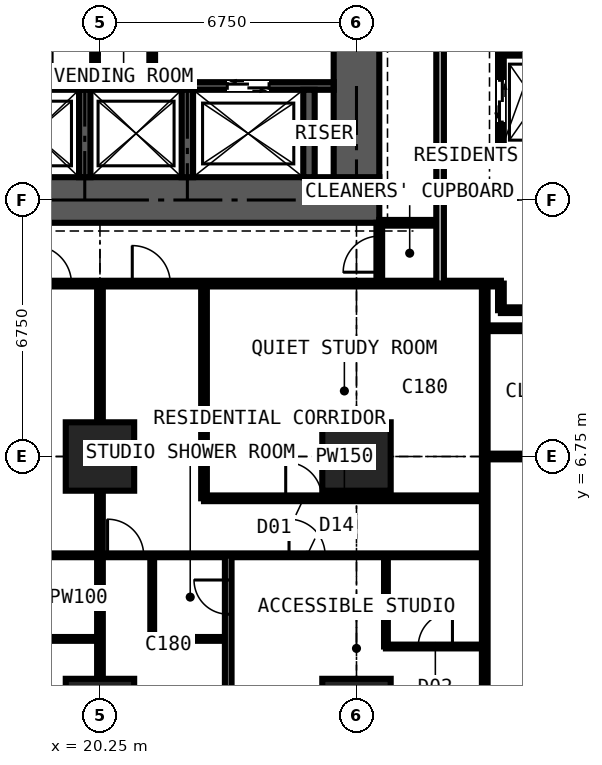
"""IFC4 building model, lengths in metres.
Left out: names, types, materials, properties, quantities, classifications, styles, units other than length and angle.
Written with IfcOpenShell. Run it as: python <this file> out.ifc"""

import sys

from ifc_helpers import new_model, si_unit, direction, frame, frame_2d, origin, origin_2d, place, context, subcontext, project, spatial, rectangle, extrude, element, fill, save


model = new_model("IFC4")
c1 = context("Model", 3, precision=1e-05, world=origin(), true_north=direction((0.0, 1.0)))
c2 = subcontext(c1, "Body", "Model", "MODEL_VIEW")
j1 = project(units=[si_unit("LENGTHUNIT", "METRE"), si_unit("PLANEANGLEUNIT", "RADIAN")], contexts=[c1])
p1 = place(None, origin())
s1 = spatial("IfcSite", under=j1, at=p1, CompositionType="ELEMENT")
p2 = place(p1, origin())
s2 = spatial("IfcBuilding", under=s1, at=p2, CompositionType="ELEMENT")
p3 = place(p2, frame((0.0, 0.0, 57.6)))
s3 = spatial("IfcBuildingStorey", under=s2, at=p3, CompositionType="ELEMENT", Elevation=57.6)
for number, where, z_axis, x_axis in (
    (1, (20.25, 0.0, 0.0), (0.0, 0.0, 1.0), (1.0, 0.0, 0.0)),
    (2, (20.25, 6.75, 0.0), (0.0, 0.0, 1.0), (1.0, 0.0, 0.0)),
    (3, (27.0, 0.0, 0.0), (0.0, 0.0, 1.0), (1.0, 0.0, 0.0)),
    (4, (27.0, 6.75, 0.0), (0.0, 0.0, 1.0), (1.0, 0.0, 0.0)),
):
    element("IfcColumn", number, at=place(p3, frame(where, z_axis=z_axis, x_axis=x_axis)), inside=s3, PredefinedType="COLUMN", context=c2, shape_type="SweptSolid", body=[
        extrude(rectangle(XDim=1.8, YDim=1.8, at=origin_2d()), origin(), (0.0, 0.0, 1.0), 3.6),
    ])
p4 = place(p3, frame((12.9, 13.5, 0.0), z_axis=(0.0, 0.0, 1.0), x_axis=(1.0, 0.0, 0.0)))
e5 = element("IfcWall", 5, at=p4, inside=s3, PredefinedType="SHEAR", context=c2, shape_type="SweptSolid", body=[
    extrude(rectangle(XDim=14.7, YDim=1.2, at=frame_2d((7.35, 0.0))), origin(), (0.0, 0.0, 1.0), 3.6),
])
p5 = place(p3, frame((27.0, 14.1, 0.0), z_axis=(0.0, 0.0, 1.0), x_axis=(0.0, 1.0, 0.0)))
e6 = element("IfcWall", 6, at=p5, inside=s3, PredefinedType="SHEAR", context=c2, shape_type="SweptSolid", body=[
    extrude(rectangle(XDim=12.3, YDim=1.2, at=frame_2d((6.15, 0.0))), origin(), (0.0, 0.0, 1.0), 3.6),
])
p6 = place(p5, frame((3.65, 0.0, 0.0)))
e7 = element("IfcOpeningElement", 7, at=p6, cuts=e6, PredefinedType="OPENING", context=c2, shape_type="SweptSolid", body=[
    extrude(rectangle(XDim=1.2, YDim=2.2, at=frame_2d((0.6, 1.1))), frame((0.0, 0.61, 0.0), z_axis=(0.0, -1.0, 0.0), x_axis=(1.0, 0.0, 0.0)), (0.0, 0.0, 1.0), 1.22),
])
p7 = place(p3, frame((14.1, 16.5, 0.0), z_axis=(0.0, 0.0, 1.0), x_axis=(1.0, 0.0, 0.0)))
e8 = element("IfcWall", 8, at=p7, inside=s3, PredefinedType="SHEAR", context=c2, shape_type="SweptSolid", body=[
    extrude(rectangle(XDim=12.3, YDim=0.2, at=frame_2d((6.15, 0.0))), origin(), (0.0, 0.0, 1.0), 3.6),
])
p8 = place(p7, frame((0.9, 0.0, 0.0)))
e9 = element("IfcOpeningElement", 9, at=p8, cuts=e8, PredefinedType="OPENING", context=c2, shape_type="SweptSolid", body=[
    extrude(rectangle(XDim=1.1, YDim=2.2, at=frame_2d((0.55, 1.1))), frame((0.0, 0.11, 0.0), z_axis=(0.0, -1.0, 0.0), x_axis=(1.0, 0.0, 0.0)), (0.0, 0.0, 1.0), 0.22),
])
p9 = place(p7, frame((9.5, 0.0, 0.0)))
e10 = element("IfcOpeningElement", 10, at=p9, cuts=e8, PredefinedType="OPENING", context=c2, shape_type="SweptSolid", body=[
    extrude(rectangle(XDim=1.1, YDim=2.2, at=frame_2d((0.55, 1.1))), frame((0.0, 0.11, 0.0), z_axis=(0.0, -1.0, 0.0), x_axis=(1.0, 0.0, 0.0)), (0.0, 0.0, 1.0), 0.22),
])
for number, where, z_axis, x_axis in (
    (11, (19.85, 14.1, 0.0), (0.0, 0.0, 1.0), (0.0, 1.0, 0.0)),
    (12, (22.55, 14.1, 0.0), (0.0, 0.0, 1.0), (0.0, 1.0, 0.0)),
    (13, (25.75, 14.1, 0.0), (0.0, 0.0, 1.0), (0.0, 1.0, 0.0)),
):
    element("IfcWall", number, at=place(p3, frame(where, z_axis=z_axis, x_axis=x_axis)), inside=s3, PredefinedType="SHEAR", context=c2, shape_type="SweptSolid", body=[
        extrude(rectangle(XDim=2.3, YDim=0.3, at=frame_2d((1.15, 0.0))), origin(), (0.0, 0.0, 1.0), 3.6),
    ])
p10 = place(p3, frame((21.625, 16.6, 0.0), z_axis=(0.0, 0.0, 1.0), x_axis=(0.0, 1.0, 0.0)))
e14 = element("IfcWall", 14, at=p10, inside=s3, PredefinedType="PARTITIONING", context=c2, shape_type="SweptSolid", body=[
    extrude(rectangle(XDim=3.5, YDim=0.15, at=frame_2d((1.75, 0.0))), origin(), (0.0, 0.0, 1.0), 3.375),
])
p11 = place(p10, frame((1.15, 0.0, 0.0)))
e15 = element("IfcOpeningElement", 15, at=p11, cuts=e14, PredefinedType="OPENING", context=c2, shape_type="SweptSolid", body=[
    extrude(rectangle(XDim=1.2, YDim=2.2, at=frame_2d((0.6, 1.1))), frame((0.0, 0.085, 0.0), z_axis=(0.0, -1.0, 0.0), x_axis=(1.0, 0.0, 0.0)), (0.0, 0.0, 1.0), 0.17),
])
p12 = place(p3, frame((20.12, 16.6, 0.0), z_axis=(0.0, 0.0, 1.0), x_axis=(0.0, 1.0, 0.0)))
e16 = element("IfcWall", 16, at=p12, inside=s3, PredefinedType="PARTITIONING", context=c2, shape_type="SweptSolid", body=[
    extrude(rectangle(XDim=3.5, YDim=0.15, at=frame_2d((1.75, 0.0))), origin(), (0.0, 0.0, 1.0), 3.375),
])
p13 = place(p3, frame((6.75, 4.15, 0.0), z_axis=(0.0, 0.0, 1.0), x_axis=(1.0, 0.0, 0.0)))
e17 = element("IfcWall", 17, at=p13, inside=s3, PredefinedType="PARTITIONING", context=c2, shape_type="SweptSolid", body=[
    extrude(rectangle(XDim=23.625, YDim=0.1, at=frame_2d((11.812, 0.0))), origin(), (0.0, 0.0, 1.0), 3.375),
])
p14 = place(p13, frame((2.85, 0.0, 0.0)))
e18 = element("IfcOpeningElement", 18, at=p14, cuts=e17, PredefinedType="OPENING", context=c2, shape_type="SweptSolid", body=[
    extrude(rectangle(XDim=1.0, YDim=2.2, at=frame_2d((0.5, 1.1))), frame((0.0, 0.06, 0.0), z_axis=(0.0, -1.0, 0.0), x_axis=(1.0, 0.0, 0.0)), (0.0, 0.0, 1.0), 0.12),
])
p15 = place(p13, frame((6.95, 0.0, 0.0)))
e19 = element("IfcOpeningElement", 19, at=p15, cuts=e17, PredefinedType="OPENING", context=c2, shape_type="SweptSolid", body=[
    extrude(rectangle(XDim=0.95, YDim=2.2, at=frame_2d((0.475, 1.1))), frame((0.0, 0.06, 0.0), z_axis=(0.0, -1.0, 0.0), x_axis=(1.0, 0.0, 0.0)), (0.0, 0.0, 1.0), 0.12),
])
p16 = place(p13, frame((10.375, 0.0, 0.0)))
e20 = element("IfcOpeningElement", 20, at=p16, cuts=e17, PredefinedType="OPENING", context=c2, shape_type="SweptSolid", body=[
    extrude(rectangle(XDim=0.95, YDim=2.2, at=frame_2d((0.475, 1.1))), frame((0.0, 0.06, 0.0), z_axis=(0.0, -1.0, 0.0), x_axis=(1.0, 0.0, 0.0)), (0.0, 0.0, 1.0), 0.12),
])
p17 = place(p13, frame((18.475, 0.0, 0.0)))
e21 = element("IfcOpeningElement", 21, at=p17, cuts=e17, PredefinedType="OPENING", context=c2, shape_type="SweptSolid", body=[
    extrude(rectangle(XDim=0.95, YDim=2.2, at=frame_2d((0.475, 1.1))), frame((0.0, 0.06, 0.0), z_axis=(0.0, -1.0, 0.0), x_axis=(1.0, 0.0, 0.0)), (0.0, 0.0, 1.0), 0.12),
])
p18 = place(p13, frame((13.7, 0.0, 0.0)))
e22 = element("IfcOpeningElement", 22, at=p18, cuts=e17, PredefinedType="OPENING", context=c2, shape_type="SweptSolid", body=[
    extrude(rectangle(XDim=0.95, YDim=2.2, at=frame_2d((0.475, 1.1))), frame((0.0, 0.06, 0.0), z_axis=(0.0, -1.0, 0.0), x_axis=(1.0, 0.0, 0.0)), (0.0, 0.0, 1.0), 0.12),
])
p19 = place(p3, frame((10.125, 11.3, 0.0), z_axis=(0.0, 0.0, 1.0), x_axis=(1.0, 0.0, 0.0)))
e23 = element("IfcWall", 23, at=p19, inside=s3, PredefinedType="PARTITIONING", context=c2, shape_type="SweptSolid", body=[
    extrude(rectangle(XDim=20.675, YDim=0.15, at=frame_2d((10.337, 0.0))), origin(), (0.0, 0.0, 1.0), 3.375),
])
p20 = place(p19, frame((8.375, 0.0, 0.0)))
e24 = element("IfcOpeningElement", 24, at=p20, cuts=e23, PredefinedType="OPENING", context=c2, shape_type="SweptSolid", body=[
    extrude(rectangle(XDim=1.0, YDim=2.2, at=frame_2d((0.5, 1.1))), frame((0.0, 0.085, 0.0), z_axis=(0.0, -1.0, 0.0), x_axis=(1.0, 0.0, 0.0)), (0.0, 0.0, 1.0), 0.17),
])
p21 = place(p19, frame((10.975, 0.0, 0.0)))
e25 = element("IfcOpeningElement", 25, at=p21, cuts=e23, PredefinedType="OPENING", context=c2, shape_type="SweptSolid", body=[
    extrude(rectangle(XDim=1.0, YDim=2.2, at=frame_2d((0.5, 1.1))), frame((0.0, 0.085, 0.0), z_axis=(0.0, -1.0, 0.0), x_axis=(1.0, 0.0, 0.0)), (0.0, 0.0, 1.0), 0.17),
])
p22 = place(p19, frame((3.925, 0.0, 0.0)))
e26 = element("IfcOpeningElement", 26, at=p22, cuts=e23, PredefinedType="OPENING", context=c2, shape_type="SweptSolid", body=[
    extrude(rectangle(XDim=0.95, YDim=2.2, at=frame_2d((0.475, 1.1))), frame((0.0, 0.085, 0.0), z_axis=(0.0, -1.0, 0.0), x_axis=(1.0, 0.0, 0.0)), (0.0, 0.0, 1.0), 0.17),
])
p23 = place(p3, frame((18.25, 1.95, 0.0), z_axis=(0.0, 0.0, 1.0), x_axis=(1.0, 0.0, 0.0)))
e27 = element("IfcWall", 27, at=p23, inside=s3, PredefinedType="PARTITIONING", context=c2, shape_type="SweptSolid", body=[
    extrude(rectangle(XDim=2.0, YDim=0.1, at=frame_2d((1.0, 0.0))), origin(), (0.0, 0.0, 1.0), 3.375),
])
p24 = place(p3, frame((20.25, -0.734, 0.0), z_axis=(0.0, 0.0, 1.0), x_axis=(0.0, 1.0, 0.0)))
e28 = element("IfcWall", 28, at=p24, inside=s3, PredefinedType="PARTITIONING", context=c2, shape_type="SweptSolid", body=[
    extrude(rectangle(XDim=12.034, YDim=0.15, at=frame_2d((6.017, 0.0))), origin(), (0.0, 0.0, 1.0), 2.61),
])
p25 = place(p3, frame((21.625, 1.95, 0.0), z_axis=(0.0, 0.0, 1.0), x_axis=(0.0, 1.0, 0.0)))
e29 = element("IfcWall", 29, at=p25, inside=s3, PredefinedType="PARTITIONING", context=c2, shape_type="SweptSolid", body=[
    extrude(rectangle(XDim=2.2, YDim=0.1, at=frame_2d((1.1, 0.0))), origin(), (0.0, 0.0, 1.0), 3.375),
])
p26 = place(p3, frame((21.625, 1.95, 0.0), z_axis=(0.0, 0.0, 1.0), x_axis=(1.0, 0.0, 0.0)))
e30 = element("IfcWall", 30, at=p26, inside=s3, PredefinedType="PARTITIONING", context=c2, shape_type="SweptSolid", body=[
    extrude(rectangle(XDim=2.0, YDim=0.1, at=frame_2d((1.0, 0.0))), origin(), (0.0, 0.0, 1.0), 3.375),
])
p27 = place(p3, frame((22.988, 5.65, 0.0), z_axis=(0.0, 0.0, 1.0), x_axis=(1.0, 0.0, 0.0)))
e31 = element("IfcWall", 31, at=p27, inside=s3, PredefinedType="PARTITIONING", context=c2, shape_type="SweptSolid", body=[
    extrude(rectangle(XDim=7.387, YDim=0.15, at=frame_2d((3.694, 0.0))), origin(), (0.0, 0.0, 1.0), 3.375),
])
p28 = place(p27, frame((2.15, 0.0, 0.0)))
e32 = element("IfcOpeningElement", 32, at=p28, cuts=e31, PredefinedType="OPENING", context=c2, shape_type="SweptSolid", body=[
    extrude(rectangle(XDim=0.95, YDim=2.2, at=frame_2d((0.475, 1.1))), frame((0.0, 0.085, 0.0), z_axis=(0.0, -1.0, 0.0), x_axis=(1.0, 0.0, 0.0)), (0.0, 0.0, 1.0), 0.17),
])
p29 = place(p3, frame((22.988, 5.65, 0.0), z_axis=(0.0, 0.0, 1.0), x_axis=(0.0, 1.0, 0.0)))
e33 = element("IfcWall", 33, at=p29, inside=s3, PredefinedType="PARTITIONING", context=c2, shape_type="SweptSolid", body=[
    extrude(rectangle(XDim=5.65, YDim=0.15, at=frame_2d((2.825, 0.0))), origin(), (0.0, 0.0, 1.0), 3.375),
])
p30 = place(p3, frame((23.625, -0.734, 0.0), z_axis=(0.0, 0.0, 1.0), x_axis=(0.0, 1.0, 0.0)))
e34 = element("IfcWall", 34, at=p30, inside=s3, PredefinedType="PARTITIONING", context=c2, shape_type="SweptSolid", body=[
    extrude(rectangle(XDim=4.884, YDim=0.175, at=frame_2d((2.442, 0.0))), origin(), (0.0, 0.0, 1.0), 3.375),
])
p31 = place(p30, frame((3.334, 0.0, 0.0)))
e35 = element("IfcOpeningElement", 35, at=p31, cuts=e34, PredefinedType="OPENING", context=c2, shape_type="SweptSolid", body=[
    extrude(rectangle(XDim=0.9, YDim=2.2, at=frame_2d((0.45, 1.1))), frame((0.0, 0.097, 0.0), z_axis=(0.0, -1.0, 0.0), x_axis=(1.0, 0.0, 0.0)), (0.0, 0.0, 1.0), 0.195),
])
p32 = place(p3, frame((27.6, 11.3, 0.0), z_axis=(0.0, 0.0, 1.0), x_axis=(0.0, 1.0, 0.0)))
e36 = element("IfcWall", 36, at=p32, inside=s3, PredefinedType="PARTITIONING", context=c2, shape_type="SweptSolid", body=[
    extrude(rectangle(XDim=1.6, YDim=0.15, at=frame_2d((0.8, 0.0))), origin(), (0.0, 0.0, 1.0), 3.375),
])
p33 = place(p32, frame((0.3, 0.0, 0.0)))
e37 = element("IfcOpeningElement", 37, at=p33, cuts=e36, PredefinedType="OPENING", context=c2, shape_type="SweptSolid", body=[
    extrude(rectangle(XDim=0.95, YDim=2.2, at=frame_2d((0.475, 1.1))), frame((0.0, 0.085, 0.0), z_axis=(0.0, -1.0, 0.0), x_axis=(1.0, 0.0, 0.0)), (0.0, 0.0, 1.0), 0.17),
])
p34 = place(p3, frame((27.6, 12.9, 0.0), z_axis=(0.0, 0.0, 1.0), x_axis=(1.0, 0.0, 0.0)))
e38 = element("IfcWall", 38, at=p34, inside=s3, PredefinedType="PARTITIONING", context=c2, shape_type="SweptSolid", body=[
    extrude(rectangle(XDim=1.6, YDim=0.15, at=frame_2d((0.8, 0.0))), origin(), (0.0, 0.0, 1.0), 2.877),
])
p35 = place(p3, frame((27.775, 1.75, 0.0), z_axis=(0.0, 0.0, 1.0), x_axis=(0.0, 1.0, 0.0)))
e39 = element("IfcWall", 39, at=p35, inside=s3, PredefinedType="PARTITIONING", context=c2, shape_type="SweptSolid", body=[
    extrude(rectangle(XDim=2.4, YDim=0.1, at=frame_2d((1.2, 0.0))), origin(), (0.0, 0.0, 1.0), 3.375),
])
p36 = place(p3, frame((27.775, 1.75, 0.0), z_axis=(0.0, 0.0, 1.0), x_axis=(1.0, 0.0, 0.0)))
e40 = element("IfcWall", 40, at=p36, inside=s3, PredefinedType="PARTITIONING", context=c2, shape_type="SweptSolid", body=[
    extrude(rectangle(XDim=2.6, YDim=0.1, at=frame_2d((1.3, 0.0))), origin(), (0.0, 0.0, 1.0), 3.375),
])
p37 = place(p36, frame((0.85, 0.0, 0.0)))
e41 = element("IfcOpeningElement", 41, at=p37, cuts=e40, PredefinedType="OPENING", context=c2, shape_type="SweptSolid", body=[
    extrude(rectangle(XDim=0.9, YDim=2.2, at=frame_2d((0.45, 1.1))), frame((0.0, 0.06, 0.0), z_axis=(0.0, -1.0, 0.0), x_axis=(1.0, 0.0, 0.0)), (0.0, 0.0, 1.0), 0.12),
])
p38 = place(p3, frame((29.2, 11.3, 0.0), z_axis=(0.0, 0.0, 1.0), x_axis=(0.0, 1.0, 0.0)))
e42 = element("IfcWall", 42, at=p38, inside=s3, PredefinedType="PARTITIONING", context=c2, shape_type="SweptSolid", body=[
    extrude(rectangle(XDim=17.9, YDim=0.2, at=frame_2d((8.95, 0.0))), origin(), (0.0, 0.0, 1.0), 3.375),
])
p39 = place(p38, frame((8.35, 0.0, 0.0)))
e43 = element("IfcOpeningElement", 43, at=p39, cuts=e42, PredefinedType="OPENING", context=c2, shape_type="SweptSolid", body=[
    extrude(rectangle(XDim=1.2, YDim=2.2, at=frame_2d((0.6, 1.1))), frame((0.0, 0.11, 0.0), z_axis=(0.0, -1.0, 0.0), x_axis=(1.0, 0.0, 0.0)), (0.0, 0.0, 1.0), 0.22),
])
p40 = place(p3, frame((30.375, -0.734, 0.0), z_axis=(0.0, 0.0, 1.0), x_axis=(0.0, 1.0, 0.0)))
e44 = element("IfcWall", 44, at=p40, inside=s3, PredefinedType="PARTITIONING", context=c2, shape_type="SweptSolid", body=[
    extrude(rectangle(XDim=12.034, YDim=0.15, at=frame_2d((6.017, 0.0))), origin(), (0.0, 0.0, 1.0), 3.375),
])
p41 = place(p3, frame((30.375, 6.75, 0.0), z_axis=(0.0, 0.0, 1.0), x_axis=(1.0, 0.0, 0.0)))
e45 = element("IfcWall", 45, at=p41, inside=s3, PredefinedType="PARTITIONING", context=c2, shape_type="SweptSolid", body=[
    extrude(rectangle(XDim=10.859, YDim=0.15, at=frame_2d((5.429, 0.0))), origin(), (0.0, 0.0, 1.0), 2.877),
])
p42 = place(p41, frame((1.45, 0.0, 0.0)))
e46 = element("IfcOpeningElement", 46, at=p42, cuts=e45, PredefinedType="OPENING", context=c2, shape_type="SweptSolid", body=[
    extrude(rectangle(XDim=1.0, YDim=2.2, at=frame_2d((0.5, 1.1))), frame((0.0, 0.085, 0.0), z_axis=(0.0, -1.0, 0.0), x_axis=(1.0, 0.0, 0.0)), (0.0, 0.0, 1.0), 0.17),
])
p43 = place(p3, frame((30.375, 10.125, 0.0), z_axis=(0.0, 0.0, 1.0), x_axis=(1.0, 0.0, 0.0)))
e47 = element("IfcWall", 47, at=p43, inside=s3, PredefinedType="PARTITIONING", context=c2, shape_type="SweptSolid", body=[
    extrude(rectangle(XDim=10.859, YDim=0.15, at=frame_2d((5.429, 0.0))), origin(), (0.0, 0.0, 1.0), 3.375),
])
p44 = place(p43, frame((2.5, 0.0, 0.0)))
e48 = element("IfcOpeningElement", 48, at=p44, cuts=e47, PredefinedType="OPENING", context=c2, shape_type="SweptSolid", body=[
    extrude(rectangle(XDim=1.0, YDim=2.2, at=frame_2d((0.5, 1.1))), frame((0.0, 0.085, 0.0), z_axis=(0.0, -1.0, 0.0), x_axis=(1.0, 0.0, 0.0)), (0.0, 0.0, 1.0), 0.17),
])
p45 = place(p3, frame((30.8, 10.6, 0.0), z_axis=(0.0, 0.0, 1.0), x_axis=(0.0, 1.0, 0.0)))
e49 = element("IfcWall", 49, at=p45, inside=s3, PredefinedType="PARTITIONING", context=c2, shape_type="SweptSolid", body=[
    extrude(rectangle(XDim=0.7, YDim=0.15, at=frame_2d((0.35, 0.0))), origin(), (0.0, 0.0, 1.0), 3.375),
])
p46 = place(p3, frame((30.8, 10.6, 0.0), z_axis=(0.0, 0.0, 1.0), x_axis=(1.0, 0.0, 0.0)))
e50 = element("IfcWall", 50, at=p46, inside=s3, PredefinedType="PARTITIONING", context=c2, shape_type="SweptSolid", body=[
    extrude(rectangle(XDim=1.85, YDim=0.15, at=frame_2d((0.925, 0.0))), origin(), (0.0, 0.0, 1.0), 3.375),
])
p47 = place(p3, frame((30.8, 14.8, 0.0), z_axis=(0.0, 0.0, 1.0), x_axis=(0.0, 1.0, 0.0)))
e51 = element("IfcWall", 51, at=p47, inside=s3, PredefinedType="PARTITIONING", context=c2, shape_type="SweptSolid", body=[
    extrude(rectangle(XDim=10.9, YDim=0.15, at=frame_2d((5.45, 0.0))), origin(), (0.0, 0.0, 1.0), 3.375),
])
p48 = place(p47, frame((0.75, 0.0, 0.0)))
e52 = element("IfcOpeningElement", 52, at=p48, cuts=e51, PredefinedType="OPENING", context=c2, shape_type="SweptSolid", body=[
    extrude(rectangle(XDim=1.1, YDim=2.2, at=frame_2d((0.55, 1.1))), frame((0.0, 0.085, 0.0), z_axis=(0.0, -1.0, 0.0), x_axis=(1.0, 0.0, 0.0)), (0.0, 0.0, 1.0), 0.17),
])
p49 = place(p47, frame((3.25, 0.0, 0.0)))
e53 = element("IfcOpeningElement", 53, at=p49, cuts=e51, PredefinedType="OPENING", context=c2, shape_type="SweptSolid", body=[
    extrude(rectangle(XDim=1.1, YDim=2.2, at=frame_2d((0.55, 1.1))), frame((0.0, 0.085, 0.0), z_axis=(0.0, -1.0, 0.0), x_axis=(1.0, 0.0, 0.0)), (0.0, 0.0, 1.0), 0.17),
])
p50 = place(p47, frame((6.5, 0.0, 0.0)))
e54 = element("IfcOpeningElement", 54, at=p50, cuts=e51, PredefinedType="OPENING", context=c2, shape_type="SweptSolid", body=[
    extrude(rectangle(XDim=1.1, YDim=2.2, at=frame_2d((0.55, 1.1))), frame((0.0, 0.085, 0.0), z_axis=(0.0, -1.0, 0.0), x_axis=(1.0, 0.0, 0.0)), (0.0, 0.0, 1.0), 0.17),
])
p51 = place(p47, frame((9.05, 0.0, 0.0)))
e55 = element("IfcOpeningElement", 55, at=p51, cuts=e51, PredefinedType="OPENING", context=c2, shape_type="SweptSolid", body=[
    extrude(rectangle(XDim=1.1, YDim=2.2, at=frame_2d((0.55, 1.1))), frame((0.0, 0.085, 0.0), z_axis=(0.0, -1.0, 0.0), x_axis=(1.0, 0.0, 0.0)), (0.0, 0.0, 1.0), 0.17),
])
for number, where, z_axis, x_axis in (
    (56, (30.8, 14.8, 0.0), (0.0, 0.0, 1.0), (1.0, 0.0, 0.0)),
    (57, (30.8, 17.35, 0.0), (0.0, 0.0, 1.0), (1.0, 0.0, 0.0)),
):
    element("IfcWall", number, at=place(p3, frame(where, z_axis=z_axis, x_axis=x_axis)), inside=s3, PredefinedType="SHEAR", context=c2, shape_type="SweptSolid", body=[
        extrude(rectangle(XDim=1.85, YDim=0.1, at=frame_2d((0.925, 0.0))), origin(), (0.0, 0.0, 1.0), 3.375),
    ])
p52 = place(p9, origin())
e58 = element("IfcDoor", 58, at=p52, inside=s3, OperationType="DOUBLE_DOOR_SLIDING", PredefinedType="DOOR", context=c2, shape_type="SweptSolid", body=[
    extrude(rectangle(XDim=1.1, YDim=2.2, at=frame_2d((0.55, 1.1))), frame((0.0, 0.025, 0.0), z_axis=(0.0, -1.0, 0.0), x_axis=(1.0, 0.0, 0.0)), (0.0, 0.0, 1.0), 0.05),
])
fill(e10, e58)
p53 = place(p33, origin())
e59 = element("IfcDoor", 59, at=p53, inside=s3, OperationType="SINGLE_SWING_LEFT", PredefinedType="DOOR", context=c2, shape_type="SweptSolid", body=[
    extrude(rectangle(XDim=0.95, YDim=2.2, at=frame_2d((0.475, 1.1))), frame((0.0, 0.025, 0.0), z_axis=(0.0, -1.0, 0.0), x_axis=(1.0, 0.0, 0.0)), (0.0, 0.0, 1.0), 0.05),
])
fill(e37, e59)
p54 = place(p20, origin())
e60 = element("IfcDoor", 60, at=p54, inside=s3, OperationType="SINGLE_SWING_LEFT", PredefinedType="DOOR", context=c2, shape_type="SweptSolid", body=[
    extrude(rectangle(XDim=1.0, YDim=2.2, at=frame_2d((0.5, 1.1))), frame((0.0, 0.025, 0.0), z_axis=(0.0, -1.0, 0.0), x_axis=(1.0, 0.0, 0.0)), (0.0, 0.0, 1.0), 0.05),
])
fill(e24, e60)
p55 = place(p17, origin())
e61 = element("IfcDoor", 61, at=p55, inside=s3, OperationType="SINGLE_SWING_LEFT", PredefinedType="DOOR", context=c2, shape_type="SweptSolid", body=[
    extrude(rectangle(XDim=0.95, YDim=2.2, at=frame_2d((0.475, 1.1))), frame((0.0, 0.025, 0.0), z_axis=(0.0, -1.0, 0.0), x_axis=(1.0, 0.0, 0.0)), (0.0, 0.0, 1.0), 0.05),
])
fill(e21, e61)
p56 = place(p37, origin())
e62 = element("IfcDoor", 62, at=p56, inside=s3, OperationType="SINGLE_SWING_RIGHT", PredefinedType="DOOR", context=c2, shape_type="SweptSolid", body=[
    extrude(rectangle(XDim=0.9, YDim=2.2, at=frame_2d((0.45, 1.1))), frame((0.0, 0.025, 0.0), z_axis=(0.0, -1.0, 0.0), x_axis=(1.0, 0.0, 0.0)), (0.0, 0.0, 1.0), 0.05),
])
fill(e41, e62)
p57 = place(p18, origin())
e63 = element("IfcDoor", 63, at=p57, inside=s3, OperationType="SINGLE_SWING_LEFT", PredefinedType="DOOR", context=c2, shape_type="SweptSolid", body=[
    extrude(rectangle(XDim=0.95, YDim=2.2, at=frame_2d((0.475, 1.1))), frame((0.0, 0.025, 0.0), z_axis=(0.0, -1.0, 0.0), x_axis=(1.0, 0.0, 0.0)), (0.0, 0.0, 1.0), 0.05),
])
fill(e22, e63)
p58 = place(p31, origin())
e64 = element("IfcDoor", 64, at=p58, inside=s3, OperationType="SINGLE_SWING_RIGHT", PredefinedType="DOOR", context=c2, shape_type="SweptSolid", body=[
    extrude(rectangle(XDim=0.9, YDim=2.2, at=frame_2d((0.45, 1.1))), frame((0.0, 0.025, 0.0), z_axis=(0.0, -1.0, 0.0), x_axis=(1.0, 0.0, 0.0)), (0.0, 0.0, 1.0), 0.05),
])
fill(e35, e64)
p59 = place(p21, origin())
e65 = element("IfcDoor", 65, at=p59, inside=s3, OperationType="SINGLE_SWING_LEFT", PredefinedType="DOOR", context=c2, shape_type="SweptSolid", body=[
    extrude(rectangle(XDim=1.0, YDim=2.2, at=frame_2d((0.5, 1.1))), frame((0.0, 0.025, 0.0), z_axis=(0.0, -1.0, 0.0), x_axis=(1.0, 0.0, 0.0)), (0.0, 0.0, 1.0), 0.05),
])
fill(e25, e65)
p60 = place(p28, origin())
e66 = element("IfcDoor", 66, at=p60, inside=s3, OperationType="SINGLE_SWING_LEFT", PredefinedType="DOOR", context=c2, shape_type="SweptSolid", body=[
    extrude(rectangle(XDim=0.95, YDim=2.2, at=frame_2d((0.475, 1.1))), frame((0.0, 0.025, 0.0), z_axis=(0.0, -1.0, 0.0), x_axis=(1.0, 0.0, 0.0)), (0.0, 0.0, 1.0), 0.05),
])
fill(e32, e66)
p61 = place(p48, origin())
e67 = element("IfcDoor", 67, at=p61, inside=s3, OperationType="DOUBLE_DOOR_SLIDING", PredefinedType="DOOR", context=c2, shape_type="SweptSolid", body=[
    extrude(rectangle(XDim=1.1, YDim=2.2, at=frame_2d((0.55, 1.1))), frame((0.0, 0.025, 0.0), z_axis=(0.0, -1.0, 0.0), x_axis=(1.0, 0.0, 0.0)), (0.0, 0.0, 1.0), 0.05),
])
fill(e52, e67)
save(model, sys.argv[1])
